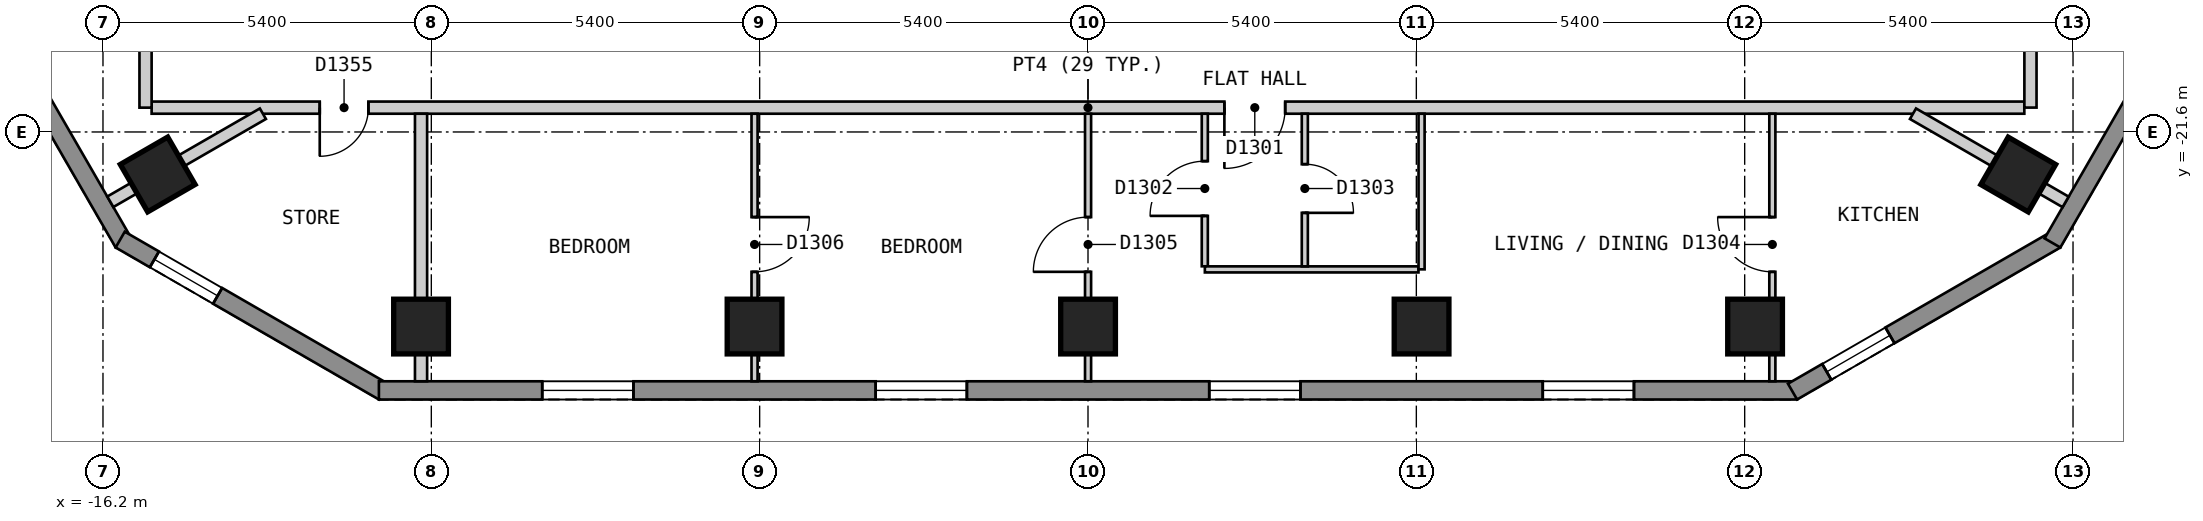
"""IFC4 building model, lengths in metres.
Left out: names, types, materials, properties, quantities, classifications, styles, units other than length and angle.
Written with IfcOpenShell. Run it as: python <this file> out.ifc"""

import sys

from ifc_helpers import new_model, si_unit, direction, frame, frame_2d, origin, origin_2d, place, context, subcontext, project, spatial, polyline, rectangle, outline, extrude, element, fill, save


model = new_model("IFC4")
c1 = context("Model", 3, precision=1e-05, world=origin(), true_north=direction((0.0, 1.0)))
c2 = subcontext(c1, "Body", "Model", "MODEL_VIEW")
j1 = project(units=[si_unit("LENGTHUNIT", "METRE"), si_unit("PLANEANGLEUNIT", "RADIAN")], contexts=[c1])
p1 = place(None, origin())
s1 = spatial("IfcSite", under=j1, at=p1, CompositionType="ELEMENT")
p2 = place(p1, origin())
s2 = spatial("IfcBuilding", under=s1, at=p2, CompositionType="ELEMENT")
p3 = place(p2, frame((0.0, 0.0, 135.6)))
s3 = spatial("IfcBuildingStorey", under=s2, at=p3, CompositionType="ELEMENT", Elevation=135.6)
for number, where, z_axis, x_axis in (
    (1, (-15.3, -22.299, 0.0), (0.0, 0.0, 1.0), (0.5, -0.866, 0.0)),
    (2, (-10.969, -24.8, 0.0), (0.0, 0.0, 1.0), (1.0, 0.0, 0.0)),
    (3, (-5.484, -24.8, 0.0), (0.0, 0.0, 1.0), (1.0, 0.0, 0.0)),
    (4, (0.001, -24.8, 0.0), (0.0, 0.0, 1.0), (1.0, 0.0, 0.0)),
    (5, (5.486, -24.8, 0.0), (0.0, 0.0, 1.0), (1.0, 0.0, 0.0)),
    (6, (10.971, -24.8, 0.0), (0.0, 0.0, 1.0), (1.0, 0.0, 0.0)),
    (7, (15.299, -22.3, 0.0), (0.0, 0.0, 1.0), (0.5, 0.866, 0.0)),
):
    element("IfcColumn", number, at=place(p3, frame(where, z_axis=z_axis, x_axis=x_axis)), inside=s3, PredefinedType="COLUMN", context=c2, shape_type="SweptSolid", body=[
        extrude(rectangle(XDim=0.9, YDim=0.9, at=origin_2d()), origin(), (0.0, 0.0, 1.0), 3.0),
    ])
p4 = place(p3, frame((-28.218, -2.025, 0.0), z_axis=(0.0, 0.0, 1.0), x_axis=(0.500017503135, -0.866015298109, 0.0)))
e8 = element("IfcWall", 8, at=p4, inside=s3, PredefinedType="SOLIDWALL", context=c2, shape_type="SweptSolid", body=[
    extrude(outline(polyline([(0.0, -0.15), (24.711, -0.15), (24.631, 0.15), (0.08, 0.15), (0.0, -0.15)])), origin(), (0.0, 0.0, 1.0), 2.7),
])
p5 = place(p4, frame((2.857, 0.0, 0.15)))
e9 = element("IfcOpeningElement", 9, at=p5, cuts=e8, PredefinedType="OPENING", context=c2, shape_type="SweptSolid", body=[
    extrude(rectangle(XDim=1.5, YDim=2.1, at=frame_2d((0.75, 1.05))), frame((0.0, 0.16, 0.0), z_axis=(0.0, -1.0, 0.0), x_axis=(1.0, 0.0, 0.0)), (0.0, 0.0, 1.0), 0.32),
])
p6 = place(p4, frame((8.689, 0.0, 0.15)))
e10 = element("IfcOpeningElement", 10, at=p6, cuts=e8, PredefinedType="OPENING", context=c2, shape_type="SweptSolid", body=[
    extrude(rectangle(XDim=1.5, YDim=2.1, at=frame_2d((0.75, 1.05))), frame((0.0, 0.16, 0.0), z_axis=(0.0, -1.0, 0.0), x_axis=(1.0, 0.0, 0.0)), (0.0, 0.0, 1.0), 0.32),
])
p7 = place(p4, frame((14.52, 0.0, 0.15)))
e11 = element("IfcOpeningElement", 11, at=p7, cuts=e8, PredefinedType="OPENING", context=c2, shape_type="SweptSolid", body=[
    extrude(rectangle(XDim=1.5, YDim=2.1, at=frame_2d((0.75, 1.05))), frame((0.0, 0.16, 0.0), z_axis=(0.0, -1.0, 0.0), x_axis=(1.0, 0.0, 0.0)), (0.0, 0.0, 1.0), 0.32),
])
p8 = place(p4, frame((20.351, 0.0, 0.15)))
e12 = element("IfcOpeningElement", 12, at=p8, cuts=e8, PredefinedType="OPENING", context=c2, shape_type="SweptSolid", body=[
    extrude(rectangle(XDim=1.5, YDim=2.1, at=frame_2d((0.75, 1.05))), frame((0.0, 0.16, 0.0), z_axis=(0.0, -1.0, 0.0), x_axis=(1.0, 0.0, 0.0)), (0.0, 0.0, 1.0), 0.32),
])
p9 = place(p3, frame((-15.917, -23.37, 0.0), z_axis=(0.0, 0.0, 1.0), x_axis=(0.866022959057, -0.500004234368, 0.0)))
e13 = element("IfcWall", 13, at=p9, inside=s3, PredefinedType="SOLIDWALL", context=c2, shape_type="SweptSolid", body=[
    extrude(outline(polyline([(0.0, -0.15), (5.0, -0.15), (4.92, 0.15), (0.08, 0.15), (0.0, -0.15)])), origin(), (0.0, 0.0, 1.0), 2.7),
])
p10 = place(p9, frame((0.65, 0.0, 0.15)))
e14 = element("IfcOpeningElement", 14, at=p10, cuts=e13, PredefinedType="OPENING", context=c2, shape_type="SweptSolid", body=[
    extrude(rectangle(XDim=1.2, YDim=2.1, at=frame_2d((0.6, 1.05))), frame((0.0, 0.16, 0.0), z_axis=(0.0, -1.0, 0.0), x_axis=(1.0, 0.0, 0.0)), (0.0, 0.0, 1.0), 0.32),
])
p11 = place(p3, frame((-11.662, -25.85, 0.0), z_axis=(0.0, 0.0, 1.0), x_axis=(1.0, 0.0, 0.0)))
e15 = element("IfcWall", 15, at=p11, inside=s3, PredefinedType="SOLIDWALL", context=c2, shape_type="SweptSolid", body=[
    extrude(outline(polyline([(0.0, -0.15), (23.324, -0.15), (23.244, 0.15), (0.08, 0.15), (0.0, -0.15)])), origin(), (0.0, 0.0, 1.0), 2.7),
])
p12 = place(p11, frame((2.686, 0.0, 0.15)))
e16 = element("IfcOpeningElement", 16, at=p12, cuts=e15, PredefinedType="OPENING", context=c2, shape_type="SweptSolid", body=[
    extrude(rectangle(XDim=1.5, YDim=2.1, at=frame_2d((0.75, 1.05))), frame((0.0, 0.16, 0.0), z_axis=(0.0, -1.0, 0.0), x_axis=(1.0, 0.0, 0.0)), (0.0, 0.0, 1.0), 0.32),
])
p13 = place(p11, frame((8.17, 0.0, 0.15)))
e17 = element("IfcOpeningElement", 17, at=p13, cuts=e15, PredefinedType="OPENING", context=c2, shape_type="SweptSolid", body=[
    extrude(rectangle(XDim=1.5, YDim=2.1, at=frame_2d((0.75, 1.05))), frame((0.0, 0.16, 0.0), z_axis=(0.0, -1.0, 0.0), x_axis=(1.0, 0.0, 0.0)), (0.0, 0.0, 1.0), 0.32),
])
p14 = place(p11, frame((13.656, 0.0, 0.15)))
e18 = element("IfcOpeningElement", 18, at=p14, cuts=e15, PredefinedType="OPENING", context=c2, shape_type="SweptSolid", body=[
    extrude(rectangle(XDim=1.5, YDim=2.1, at=frame_2d((0.75, 1.05))), frame((0.0, 0.16, 0.0), z_axis=(0.0, -1.0, 0.0), x_axis=(1.0, 0.0, 0.0)), (0.0, 0.0, 1.0), 0.32),
])
p15 = place(p11, frame((19.141, 0.0, 0.15)))
e19 = element("IfcOpeningElement", 19, at=p15, cuts=e15, PredefinedType="OPENING", context=c2, shape_type="SweptSolid", body=[
    extrude(rectangle(XDim=1.5, YDim=2.1, at=frame_2d((0.75, 1.05))), frame((0.0, 0.16, 0.0), z_axis=(0.0, -1.0, 0.0), x_axis=(1.0, 0.0, 0.0)), (0.0, 0.0, 1.0), 0.32),
])
p16 = place(p3, frame((11.587, -25.87, 0.0), z_axis=(0.0, 0.0, 1.0), x_axis=(0.866022959057, 0.500004234368, 0.0)))
e20 = element("IfcWall", 20, at=p16, inside=s3, PredefinedType="SOLIDWALL", context=c2, shape_type="SweptSolid", body=[
    extrude(outline(polyline([(0.0, -0.15), (5.0, -0.15), (4.92, 0.15), (0.08, 0.15), (0.0, -0.15)])), origin(), (0.0, 0.0, 1.0), 2.7),
])
p17 = place(p16, frame((0.65, 0.0, 0.15)))
e21 = element("IfcOpeningElement", 21, at=p17, cuts=e20, PredefinedType="OPENING", context=c2, shape_type="SweptSolid", body=[
    extrude(rectangle(XDim=1.2, YDim=2.1, at=frame_2d((0.6, 1.05))), frame((0.0, 0.16, 0.0), z_axis=(0.0, -1.0, 0.0), x_axis=(1.0, 0.0, 0.0)), (0.0, 0.0, 1.0), 0.32),
])
p18 = place(p3, frame((15.862, -23.425, 0.0), z_axis=(0.0, 0.0, 1.0), x_axis=(0.500017503135, 0.866015298109, 0.0)))
e22 = element("IfcWall", 22, at=p18, inside=s3, PredefinedType="SOLIDWALL", context=c2, shape_type="SweptSolid", body=[
    extrude(outline(polyline([(0.0, -0.15), (24.711, -0.15), (24.631, 0.15), (0.08, 0.15), (0.0, -0.15)])), origin(), (0.0, 0.0, 1.0), 2.7),
])
p19 = place(p18, frame((2.857, 0.0, 0.15)))
e23 = element("IfcOpeningElement", 23, at=p19, cuts=e22, PredefinedType="OPENING", context=c2, shape_type="SweptSolid", body=[
    extrude(rectangle(XDim=1.5, YDim=2.1, at=frame_2d((0.75, 1.05))), frame((0.0, 0.16, 0.0), z_axis=(0.0, -1.0, 0.0), x_axis=(1.0, 0.0, 0.0)), (0.0, 0.0, 1.0), 0.32),
])
p20 = place(p18, frame((8.689, 0.0, 0.15)))
e24 = element("IfcOpeningElement", 24, at=p20, cuts=e22, PredefinedType="OPENING", context=c2, shape_type="SweptSolid", body=[
    extrude(rectangle(XDim=1.5, YDim=2.1, at=frame_2d((0.75, 1.05))), frame((0.0, 0.16, 0.0), z_axis=(0.0, -1.0, 0.0), x_axis=(1.0, 0.0, 0.0)), (0.0, 0.0, 1.0), 0.32),
])
p21 = place(p18, frame((14.52, 0.0, 0.15)))
e25 = element("IfcOpeningElement", 25, at=p21, cuts=e22, PredefinedType="OPENING", context=c2, shape_type="SweptSolid", body=[
    extrude(rectangle(XDim=1.5, YDim=2.1, at=frame_2d((0.75, 1.05))), frame((0.0, 0.16, 0.0), z_axis=(0.0, -1.0, 0.0), x_axis=(1.0, 0.0, 0.0)), (0.0, 0.0, 1.0), 0.32),
])
p22 = place(p18, frame((20.351, 0.0, 0.15)))
e26 = element("IfcOpeningElement", 26, at=p22, cuts=e22, PredefinedType="OPENING", context=c2, shape_type="SweptSolid", body=[
    extrude(rectangle(XDim=1.5, YDim=2.1, at=frame_2d((0.75, 1.05))), frame((0.0, 0.16, 0.0), z_axis=(0.0, -1.0, 0.0), x_axis=(1.0, 0.0, 0.0)), (0.0, 0.0, 1.0), 0.32),
])
p23 = place(p3, frame((-15.4, -21.2, 0.0), z_axis=(0.0, 0.0, 1.0), x_axis=(1.0, 0.0, 0.0)))
e27 = element("IfcWall", 27, at=p23, inside=s3, PredefinedType="PARTITIONING", context=c2, shape_type="SweptSolid", body=[
    extrude(rectangle(XDim=30.799, YDim=0.2, at=frame_2d((15.399, 0.0))), origin(), (0.0, 0.0, 1.0), 2.7),
])
p24 = place(p23, frame((17.643, 0.0, 0.0)))
e28 = element("IfcOpeningElement", 28, at=p24, cuts=e27, PredefinedType="OPENING", context=c2, shape_type="SweptSolid", body=[
    extrude(rectangle(XDim=1.0, YDim=2.1, at=frame_2d((0.5, 1.05))), frame((0.0, 0.11, 0.0), z_axis=(0.0, -1.0, 0.0), x_axis=(1.0, 0.0, 0.0)), (0.0, 0.0, 1.0), 0.22),
])
p25 = place(p23, frame((2.765, 0.0, 0.0)))
e29 = element("IfcOpeningElement", 29, at=p25, cuts=e27, PredefinedType="OPENING", context=c2, shape_type="SweptSolid", body=[
    extrude(rectangle(XDim=0.8, YDim=2.1, at=frame_2d((0.4, 1.05))), frame((0.0, 0.11, 0.0), z_axis=(0.0, -1.0, 0.0), x_axis=(1.0, 0.0, 0.0)), (0.0, 0.0, 1.0), 0.22),
])
p26 = place(p3, frame((15.5, -21.199, 0.0), z_axis=(0.0, 0.0, 1.0), x_axis=(0.0, 1.0, 0.0)))
e30 = element("IfcWall", 30, at=p26, inside=s3, PredefinedType="PARTITIONING", context=c2, shape_type="SweptSolid", body=[
    extrude(rectangle(XDim=5.458, YDim=0.2, at=frame_2d((2.729, 0.0))), origin(), (0.0, 0.0, 1.0), 2.7),
])
p27 = place(p3, frame((-15.5, -21.2, 0.0), z_axis=(0.0, 0.0, 1.0), x_axis=(0.0, 1.0, 0.0)))
e31 = element("IfcWall", 31, at=p27, inside=s3, PredefinedType="PARTITIONING", context=c2, shape_type="SweptSolid", body=[
    extrude(rectangle(XDim=4.8, YDim=0.2, at=frame_2d((2.4, 0.0))), origin(), (0.0, 0.0, 1.0), 2.7),
])
p28 = place(p27, frame((1.94, 0.0, 0.0)))
e32 = element("IfcOpeningElement", 32, at=p28, cuts=e31, PredefinedType="OPENING", context=c2, shape_type="SweptSolid", body=[
    extrude(rectangle(XDim=0.8, YDim=2.1, at=frame_2d((0.4, 1.05))), frame((0.0, 0.11, 0.0), z_axis=(0.0, -1.0, 0.0), x_axis=(1.0, 0.0, 0.0)), (0.0, 0.0, 1.0), 0.22),
])
p29 = place(p3, frame((1.921, -21.3, 0.0), z_axis=(0.0, 0.0, 1.0), x_axis=(0.0, -1.0, 0.0)))
e33 = element("IfcWall", 33, at=p29, inside=s3, PredefinedType="PARTITIONING", context=c2, shape_type="SweptSolid", body=[
    extrude(rectangle(XDim=2.509, YDim=0.1, at=frame_2d((1.254, 0.0))), origin(), (0.0, 0.0, 1.0), 2.7),
])
p30 = place(p29, frame((0.78, 0.0, 0.0)))
e34 = element("IfcOpeningElement", 34, at=p30, cuts=e33, PredefinedType="OPENING", context=c2, shape_type="SweptSolid", body=[
    extrude(rectangle(XDim=0.9, YDim=2.1, at=frame_2d((0.45, 1.05))), frame((0.0, 0.06, 0.0), z_axis=(0.0, -1.0, 0.0), x_axis=(1.0, 0.0, 0.0)), (0.0, 0.0, 1.0), 0.12),
])
p31 = place(p3, frame((1.922, -23.86, 0.0), z_axis=(0.0, 0.0, 1.0), x_axis=(1.0, 0.0, 0.0)))
e35 = element("IfcWall", 35, at=p31, inside=s3, PredefinedType="PARTITIONING", context=c2, shape_type="SweptSolid", body=[
    extrude(rectangle(XDim=3.513, YDim=0.1, at=frame_2d((1.756, 0.0))), origin(), (0.0, 0.0, 1.0), 2.7),
])
p32 = place(p3, frame((3.566, -23.81, 0.0), z_axis=(0.0, 0.0, 1.0), x_axis=(0.0, 1.0, 0.0)))
e36 = element("IfcWall", 36, at=p32, inside=s3, PredefinedType="PARTITIONING", context=c2, shape_type="SweptSolid", body=[
    extrude(rectangle(XDim=2.51, YDim=0.1, at=frame_2d((1.255, 0.0))), origin(), (0.0, 0.0, 1.0), 2.7),
])
p33 = place(p32, frame((0.88, 0.0, 0.0)))
e37 = element("IfcOpeningElement", 37, at=p33, cuts=e36, PredefinedType="OPENING", context=c2, shape_type="SweptSolid", body=[
    extrude(rectangle(XDim=0.8, YDim=2.1, at=frame_2d((0.4, 1.05))), frame((0.0, 0.06, 0.0), z_axis=(0.0, -1.0, 0.0), x_axis=(1.0, 0.0, 0.0)), (0.0, 0.0, 1.0), 0.12),
])
p34 = place(p3, frame((5.486, -23.859, 0.0), z_axis=(0.0, 0.0, 1.0), x_axis=(0.0, 1.0, 0.0)))
e38 = element("IfcWall", 38, at=p34, inside=s3, PredefinedType="PARTITIONING", context=c2, shape_type="SweptSolid", body=[
    extrude(rectangle(XDim=2.559, YDim=0.1, at=frame_2d((1.279, 0.0))), origin(), (0.0, 0.0, 1.0), 2.7),
])
p35 = place(p3, frame((11.255, -25.7, 0.0), z_axis=(0.0, 0.0, 1.0), x_axis=(0.0, 1.0, 0.0)))
e39 = element("IfcWall", 39, at=p35, inside=s3, PredefinedType="PARTITIONING", context=c2, shape_type="SweptSolid", body=[
    extrude(rectangle(XDim=4.4, YDim=0.1, at=frame_2d((2.2, 0.0))), origin(), (0.0, 0.0, 1.0), 2.7),
])
p36 = place(p35, frame((1.8, 0.0, 0.0)))
e40 = element("IfcOpeningElement", 40, at=p36, cuts=e39, PredefinedType="OPENING", context=c2, shape_type="SweptSolid", body=[
    extrude(rectangle(XDim=0.9, YDim=2.1, at=frame_2d((0.45, 1.05))), frame((0.0, 0.06, 0.0), z_axis=(0.0, -1.0, 0.0), x_axis=(1.0, 0.0, 0.0)), (0.0, 0.0, 1.0), 0.12),
])
p37 = place(p3, frame((0.001, -25.7, 0.0), z_axis=(0.0, 0.0, 1.0), x_axis=(0.0, 1.0, 0.0)))
e41 = element("IfcWall", 41, at=p37, inside=s3, PredefinedType="PARTITIONING", context=c2, shape_type="SweptSolid", body=[
    extrude(rectangle(XDim=4.4, YDim=0.1, at=frame_2d((2.2, 0.0))), origin(), (0.0, 0.0, 1.0), 2.7),
])
p38 = place(p37, frame((1.8, 0.0, 0.0)))
e42 = element("IfcOpeningElement", 42, at=p38, cuts=e41, PredefinedType="OPENING", context=c2, shape_type="SweptSolid", body=[
    extrude(rectangle(XDim=0.9, YDim=2.1, at=frame_2d((0.45, 1.05))), frame((0.0, 0.06, 0.0), z_axis=(0.0, -1.0, 0.0), x_axis=(1.0, 0.0, 0.0)), (0.0, 0.0, 1.0), 0.12),
])
p39 = place(p3, frame((-5.484, -25.7, 0.0), z_axis=(0.0, 0.0, 1.0), x_axis=(0.0, 1.0, 0.0)))
e43 = element("IfcWall", 43, at=p39, inside=s3, PredefinedType="PARTITIONING", context=c2, shape_type="SweptSolid", body=[
    extrude(rectangle(XDim=4.4, YDim=0.1, at=frame_2d((2.2, 0.0))), origin(), (0.0, 0.0, 1.0), 2.7),
])
p40 = place(p39, frame((1.8, 0.0, 0.0)))
e44 = element("IfcOpeningElement", 44, at=p40, cuts=e43, PredefinedType="OPENING", context=c2, shape_type="SweptSolid", body=[
    extrude(rectangle(XDim=0.9, YDim=2.1, at=frame_2d((0.45, 1.05))), frame((0.0, 0.06, 0.0), z_axis=(0.0, -1.0, 0.0), x_axis=(1.0, 0.0, 0.0)), (0.0, 0.0, 1.0), 0.12),
])
p41 = place(p3, frame((13.568, -21.3, 0.0), z_axis=(0.0, 0.0, 1.0), x_axis=(0.865885342641, -0.500242514586, 0.0)))
e45 = element("IfcWall", 45, at=p41, inside=s3, PredefinedType="PARTITIONING", context=c2, shape_type="SweptSolid", body=[
    extrude(rectangle(XDim=2.898, YDim=0.2, at=frame_2d((1.449, 0.0))), origin(), (0.0, 0.0, 1.0), 2.7),
])
p42 = place(p3, frame((-10.969, -25.7, 0.0), z_axis=(0.0, 0.0, 1.0), x_axis=(0.0, 1.0, 0.0)))
e46 = element("IfcWall", 46, at=p42, inside=s3, PredefinedType="PARTITIONING", context=c2, shape_type="SweptSolid", body=[
    extrude(rectangle(XDim=4.4, YDim=0.2, at=frame_2d((2.2, 0.0))), origin(), (0.0, 0.0, 1.0), 2.7),
])
p43 = place(p3, frame((-16.079, -22.748, 0.0), z_axis=(0.0, 0.0, 1.0), x_axis=(0.866114021284, 0.499846478567, 0.0)))
e47 = element("IfcWall", 47, at=p43, inside=s3, PredefinedType="PARTITIONING", context=c2, shape_type="SweptSolid", body=[
    extrude(rectangle(XDim=2.897, YDim=0.2, at=frame_2d((1.448, 0.0))), origin(), (0.0, 0.0, 1.0), 2.7),
])
p44 = place(p10, origin())
e48 = element("IfcWindow", 48, at=p44, inside=s3, PartitioningType="SINGLE_PANEL", PredefinedType="WINDOW", context=c2, shape_type="SweptSolid", body=[
    extrude(rectangle(XDim=1.2, YDim=2.1, at=frame_2d((0.6, 1.05))), frame((0.0, 0.03, 0.0), z_axis=(0.0, -1.0, 0.0), x_axis=(1.0, 0.0, 0.0)), (0.0, 0.0, 1.0), 0.06),
])
fill(e14, e48)
p45 = place(p12, origin())
e49 = element("IfcWindow", 49, at=p45, inside=s3, PartitioningType="SINGLE_PANEL", PredefinedType="WINDOW", context=c2, shape_type="SweptSolid", body=[
    extrude(rectangle(XDim=1.5, YDim=2.1, at=frame_2d((0.75, 1.05))), frame((0.0, 0.03, 0.0), z_axis=(0.0, -1.0, 0.0), x_axis=(1.0, 0.0, 0.0)), (0.0, 0.0, 1.0), 0.06),
])
fill(e16, e49)
p46 = place(p13, origin())
e50 = element("IfcWindow", 50, at=p46, inside=s3, PartitioningType="SINGLE_PANEL", PredefinedType="WINDOW", context=c2, shape_type="SweptSolid", body=[
    extrude(rectangle(XDim=1.5, YDim=2.1, at=frame_2d((0.75, 1.05))), frame((0.0, 0.03, 0.0), z_axis=(0.0, -1.0, 0.0), x_axis=(1.0, 0.0, 0.0)), (0.0, 0.0, 1.0), 0.06),
])
fill(e17, e50)
p47 = place(p14, origin())
e51 = element("IfcWindow", 51, at=p47, inside=s3, PartitioningType="SINGLE_PANEL", PredefinedType="WINDOW", context=c2, shape_type="SweptSolid", body=[
    extrude(rectangle(XDim=1.5, YDim=2.1, at=frame_2d((0.75, 1.05))), frame((0.0, 0.03, 0.0), z_axis=(0.0, -1.0, 0.0), x_axis=(1.0, 0.0, 0.0)), (0.0, 0.0, 1.0), 0.06),
])
fill(e18, e51)
p48 = place(p15, origin())
e52 = element("IfcWindow", 52, at=p48, inside=s3, PartitioningType="SINGLE_PANEL", PredefinedType="WINDOW", context=c2, shape_type="SweptSolid", body=[
    extrude(rectangle(XDim=1.5, YDim=2.1, at=frame_2d((0.75, 1.05))), frame((0.0, 0.03, 0.0), z_axis=(0.0, -1.0, 0.0), x_axis=(1.0, 0.0, 0.0)), (0.0, 0.0, 1.0), 0.06),
])
fill(e19, e52)
p49 = place(p17, origin())
e53 = element("IfcWindow", 53, at=p49, inside=s3, PartitioningType="SINGLE_PANEL", PredefinedType="WINDOW", context=c2, shape_type="SweptSolid", body=[
    extrude(rectangle(XDim=1.2, YDim=2.1, at=frame_2d((0.6, 1.05))), frame((0.0, 0.03, 0.0), z_axis=(0.0, -1.0, 0.0), x_axis=(1.0, 0.0, 0.0)), (0.0, 0.0, 1.0), 0.06),
])
fill(e21, e53)
p50 = place(p24, origin())
e54 = element("IfcDoor", 54, at=p50, inside=s3, OperationType="SINGLE_SWING_LEFT", PredefinedType="DOOR", context=c2, shape_type="SweptSolid", body=[
    extrude(rectangle(XDim=1.0, YDim=2.1, at=frame_2d((0.5, 1.05))), frame((0.0, 0.025, 0.0), z_axis=(0.0, -1.0, 0.0), x_axis=(1.0, 0.0, 0.0)), (0.0, 0.0, 1.0), 0.05),
])
fill(e28, e54)
p51 = place(p30, origin())
e55 = element("IfcDoor", 55, at=p51, inside=s3, OperationType="SINGLE_SWING_RIGHT", PredefinedType="DOOR", context=c2, shape_type="SweptSolid", body=[
    extrude(rectangle(XDim=0.9, YDim=2.1, at=frame_2d((0.45, 1.05))), frame((0.0, 0.025, 0.0), z_axis=(0.0, -1.0, 0.0), x_axis=(1.0, 0.0, 0.0)), (0.0, 0.0, 1.0), 0.05),
])
fill(e34, e55)
p52 = place(p33, origin())
e56 = element("IfcDoor", 56, at=p52, inside=s3, OperationType="SINGLE_SWING_LEFT", PredefinedType="DOOR", context=c2, shape_type="SweptSolid", body=[
    extrude(rectangle(XDim=0.8, YDim=2.1, at=frame_2d((0.4, 1.05))), frame((0.0, 0.025, 0.0), z_axis=(0.0, -1.0, 0.0), x_axis=(1.0, 0.0, 0.0)), (0.0, 0.0, 1.0), 0.05),
])
fill(e37, e56)
p53 = place(p36, origin())
e57 = element("IfcDoor", 57, at=p53, inside=s3, OperationType="SINGLE_SWING_RIGHT", PredefinedType="DOOR", context=c2, shape_type="SweptSolid", body=[
    extrude(rectangle(XDim=0.9, YDim=2.1, at=frame_2d((0.45, 1.05))), frame((0.0, 0.025, 0.0), z_axis=(0.0, -1.0, 0.0), x_axis=(1.0, 0.0, 0.0)), (0.0, 0.0, 1.0), 0.05),
])
fill(e40, e57)
p54 = place(p38, origin())
e58 = element("IfcDoor", 58, at=p54, inside=s3, OperationType="SINGLE_SWING_LEFT", PredefinedType="DOOR", context=c2, shape_type="SweptSolid", body=[
    extrude(rectangle(XDim=0.9, YDim=2.1, at=frame_2d((0.45, 1.05))), frame((0.0, 0.025, 0.0), z_axis=(0.0, -1.0, 0.0), x_axis=(1.0, 0.0, 0.0)), (0.0, 0.0, 1.0), 0.05),
])
fill(e42, e58)
p55 = place(p40, origin())
e59 = element("IfcDoor", 59, at=p55, inside=s3, OperationType="SINGLE_SWING_RIGHT", PredefinedType="DOOR", context=c2, shape_type="SweptSolid", body=[
    extrude(rectangle(XDim=0.9, YDim=2.1, at=frame_2d((0.45, 1.05))), frame((0.0, 0.025, 0.0), z_axis=(0.0, -1.0, 0.0), x_axis=(1.0, 0.0, 0.0)), (0.0, 0.0, 1.0), 0.05),
])
fill(e44, e59)
p56 = place(p25, origin())
e60 = element("IfcDoor", 60, at=p56, inside=s3, OperationType="SINGLE_SWING_LEFT", PredefinedType="DOOR", context=c2, shape_type="SweptSolid", body=[
    extrude(rectangle(XDim=0.8, YDim=2.1, at=frame_2d((0.4, 1.05))), frame((0.0, 0.025, 0.0), z_axis=(0.0, -1.0, 0.0), x_axis=(1.0, 0.0, 0.0)), (0.0, 0.0, 1.0), 0.05),
])
fill(e29, e60)
save(model, sys.argv[1])
